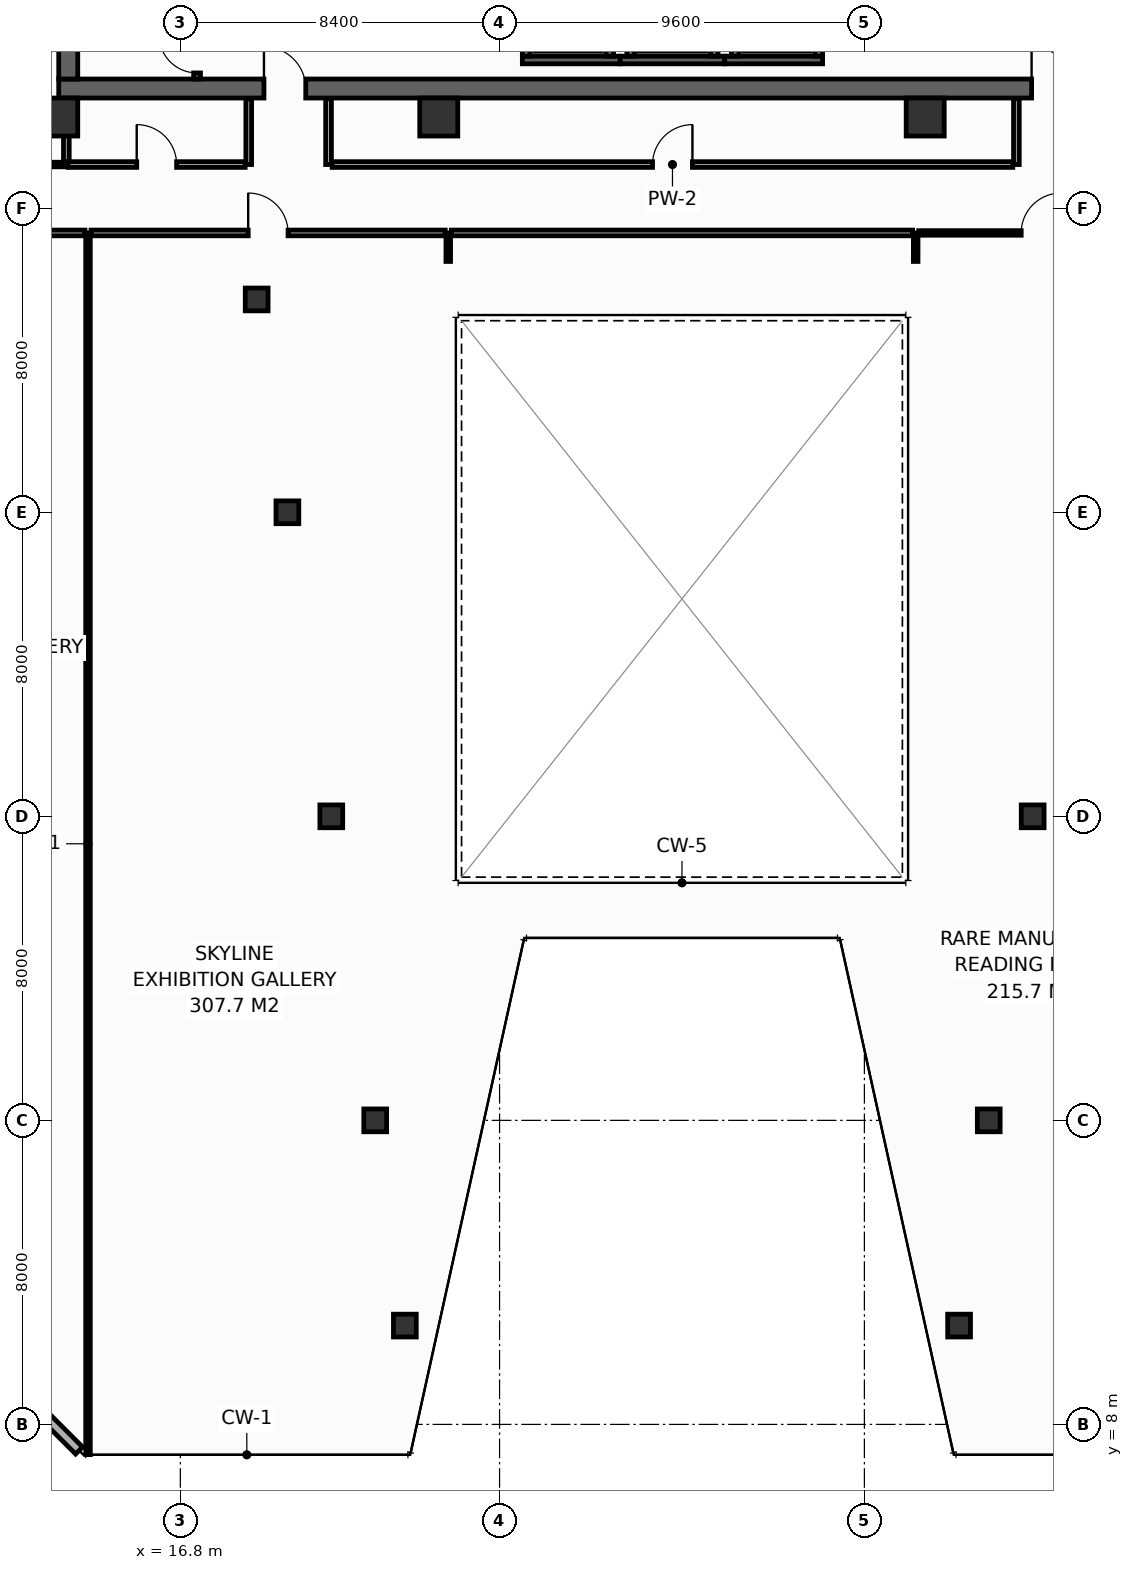
"""IFC4 building model, lengths in metres.
Left out: names, types, materials, properties, quantities, classifications, styles, units other than length and angle.
Written with IfcOpenShell. Run it as: python <this file> out.ifc"""

import sys

from ifc_helpers import new_model, si_unit, direction, frame, frame_2d, origin, origin_2d, place, context, subcontext, project, spatial, rectangle, hollow_rectangle, extrude, element, fill, save


model = new_model("IFC4")
c1 = context("Model", 3, precision=1e-05, world=origin(), true_north=direction((0.0, 1.0)))
c2 = subcontext(c1, "Body", "Model", "MODEL_VIEW")
j1 = project(units=[si_unit("LENGTHUNIT", "METRE"), si_unit("PLANEANGLEUNIT", "RADIAN")], contexts=[c1])
p1 = place(None, origin())
s1 = spatial("IfcSite", under=j1, at=p1, CompositionType="ELEMENT")
p2 = place(p1, origin())
s2 = spatial("IfcBuilding", under=s1, at=p2, CompositionType="ELEMENT")
p3 = place(p2, frame((0.0, 0.0, 156.2)))
s3 = spatial("IfcBuildingStorey", under=s2, at=p3, CompositionType="ELEMENT", Elevation=156.2)
p4 = place(p3, frame((13.6, 43.15, 0.0), z_axis=(0.0, 0.0, 1.0), x_axis=(1.0, 0.0, 0.0)))
e1 = element("IfcWall", 1, at=p4, inside=s3, PredefinedType="SHEAR", context=c2, shape_type="SweptSolid", body=[
    extrude(rectangle(XDim=32.7, YDim=0.5, at=frame_2d((16.35, 0.0))), origin(), (0.0, 0.0, 1.0), 3.55),
])
p5 = place(p4, frame((5.4, 0.0, 0.0)))
e2 = element("IfcOpeningElement", 2, at=p5, cuts=e1, PredefinedType="OPENING", context=c2, shape_type="SweptSolid", body=[
    extrude(rectangle(XDim=1.1, YDim=2.15, at=frame_2d((0.55, 1.075))), frame((0.0, 0.26, 0.0), z_axis=(0.0, -1.0, 0.0), x_axis=(1.0, 0.0, 0.0)), (0.0, 0.0, 1.0), 0.52),
])
p6 = place(p4, frame((25.6, 0.0, 0.0)))
e3 = element("IfcOpeningElement", 3, at=p6, cuts=e1, PredefinedType="OPENING", context=c2, shape_type="SweptSolid", body=[
    extrude(rectangle(XDim=1.1, YDim=2.15, at=frame_2d((0.55, 1.075))), frame((0.0, 0.26, 0.0), z_axis=(0.0, -1.0, 0.0), x_axis=(1.0, 0.0, 0.0)), (0.0, 0.0, 1.0), 0.52),
])
p7 = place(p3, frame((13.85, 43.4, 0.0), z_axis=(0.0, 0.0, 1.0), x_axis=(0.0, 1.0, 0.0)))
e4 = element("IfcWall", 4, at=p7, inside=s3, PredefinedType="SHEAR", context=c2, shape_type="SweptSolid", body=[
    extrude(rectangle(XDim=10.4, YDim=0.5, at=frame_2d((5.2, 0.0))), origin(), (0.0, 0.0, 1.0), 3.55),
])
for number, where, z_axis, x_axis in (
    (5, (13.6, 42.4, 0.0), (0.0, 0.0, 1.0), (1.0, 0.0, 0.0)),
    (6, (23.6, 42.4, 0.0), (0.0, 0.0, 1.0), (1.0, 0.0, 0.0)),
    (7, (36.4, 42.4, 0.0), (0.0, 0.0, 1.0), (1.0, 0.0, 0.0)),
):
    element("IfcColumn", number, at=place(p3, frame(where, z_axis=z_axis, x_axis=x_axis)), inside=s3, PredefinedType="COLUMN", context=c2, shape_type="SweptSolid", body=[
        extrude(hollow_rectangle(XDim=1.0, YDim=1.0, WallThickness=0.045, at=origin_2d()), origin(), (0.0, 0.0, 1.0), 3.8),
    ])
for number, where, z_axis, x_axis in (
    (8, (22.708, 10.6, 0.0), (0.0, 0.0, 1.0), (1.0, 0.0, 0.0)),
    (9, (37.292, 10.6, 0.0), (0.0, 0.0, 1.0), (1.0, 0.0, 0.0)),
    (10, (21.928, 16.0, 0.0), (0.0, 0.0, 1.0), (1.0, 0.0, 0.0)),
    (11, (38.072, 16.0, 0.0), (0.0, 0.0, 1.0), (1.0, 0.0, 0.0)),
    (12, (20.772, 24.0, 0.0), (0.0, 0.0, 1.0), (1.0, 0.0, 0.0)),
    (13, (39.228, 24.0, 0.0), (0.0, 0.0, 1.0), (1.0, 0.0, 0.0)),
    (14, (19.617, 32.0, 0.0), (0.0, 0.0, 1.0), (1.0, 0.0, 0.0)),
    (15, (18.808, 37.6, 0.0), (0.0, 0.0, 1.0), (1.0, 0.0, 0.0)),
):
    element("IfcColumn", number, at=place(p3, frame(where, z_axis=z_axis, x_axis=x_axis)), inside=s3, PredefinedType="COLUMN", context=c2, shape_type="SweptSolid", body=[
        extrude(hollow_rectangle(XDim=0.6, YDim=0.6, WallThickness=0.028, at=origin_2d()), origin(), (0.0, 0.0, 1.0), 3.8),
    ])
p8 = place(p3, frame((25.8, 43.9, 0.0), z_axis=(0.0, 0.0, 1.0), x_axis=(1.0, 0.0, 0.0)))
e16 = element("IfcWall", 16, at=p8, inside=s3, PredefinedType="SHEAR", context=c2, shape_type="SweptSolid", body=[
    extrude(rectangle(XDim=2.575, YDim=0.2, at=frame_2d((1.288, 0.0))), origin(), (0.0, 0.0, 1.0), 3.55),
])
for number, where, z_axis, x_axis in (
    (17, (25.9, 44.0, 0.0), (0.0, 0.0, 1.0), (0.0, 1.0, 0.0)),
    (18, (28.1, 44.0, 0.0), (0.0, 0.0, 1.0), (0.0, 1.0, 0.0)),
):
    element("IfcWall", number, at=place(p3, frame(where, z_axis=z_axis, x_axis=x_axis)), inside=s3, PredefinedType="SHEAR", context=c2, shape_type="SweptSolid", body=[
        extrude(rectangle(XDim=2.3, YDim=0.2, at=frame_2d((1.15, 0.0))), origin(), (0.0, 0.0, 1.0), 3.55),
    ])
p9 = place(p3, frame((28.375, 43.9, 0.0), z_axis=(0.0, 0.0, 1.0), x_axis=(1.0, 0.0, 0.0)))
e19 = element("IfcWall", 19, at=p9, inside=s3, PredefinedType="SHEAR", context=c2, shape_type="SweptSolid", body=[
    extrude(rectangle(XDim=2.75, YDim=0.2, at=frame_2d((1.375, 0.0))), origin(), (0.0, 0.0, 1.0), 3.55),
])
for number, where, z_axis, x_axis in (
    (20, (28.65, 44.0, 0.0), (0.0, 0.0, 1.0), (0.0, 1.0, 0.0)),
    (21, (30.85, 44.0, 0.0), (0.0, 0.0, 1.0), (0.0, 1.0, 0.0)),
):
    element("IfcWall", number, at=place(p3, frame(where, z_axis=z_axis, x_axis=x_axis)), inside=s3, PredefinedType="SHEAR", context=c2, shape_type="SweptSolid", body=[
        extrude(rectangle(XDim=2.3, YDim=0.2, at=frame_2d((1.15, 0.0))), origin(), (0.0, 0.0, 1.0), 3.55),
    ])
p10 = place(p3, frame((31.125, 43.9, 0.0), z_axis=(0.0, 0.0, 1.0), x_axis=(1.0, 0.0, 0.0)))
e22 = element("IfcWall", 22, at=p10, inside=s3, PredefinedType="SHEAR", context=c2, shape_type="SweptSolid", body=[
    extrude(rectangle(XDim=2.575, YDim=0.2, at=frame_2d((1.288, 0.0))), origin(), (0.0, 0.0, 1.0), 3.55),
])
for number, where, z_axis, x_axis in (
    (23, (31.4, 44.0, 0.0), (0.0, 0.0, 1.0), (0.0, 1.0, 0.0)),
    (24, (33.6, 44.0, 0.0), (0.0, 0.0, 1.0), (0.0, 1.0, 0.0)),
):
    element("IfcWall", number, at=place(p3, frame(where, z_axis=z_axis, x_axis=x_axis)), inside=s3, PredefinedType="SHEAR", context=c2, shape_type="SweptSolid", body=[
        extrude(rectangle(XDim=2.3, YDim=0.2, at=frame_2d((1.15, 0.0))), origin(), (0.0, 0.0, 1.0), 3.55),
    ])
p11 = place(p3, frame((17.24, 43.4, 0.0), z_axis=(0.0, 0.0, 1.0), x_axis=(0.0, 1.0, 0.0)))
e25 = element("IfcWall", 25, at=p11, inside=s3, PredefinedType="SHEAR", context=c2, shape_type="SweptSolid", body=[
    extrude(rectangle(XDim=10.4, YDim=0.18, at=frame_2d((5.2, 0.0))), origin(), (0.0, 0.0, 1.0), 3.55),
])
p12 = place(p11, frame((0.16, 0.0, 0.0)))
e26 = element("IfcOpeningElement", 26, at=p12, cuts=e25, PredefinedType="OPENING", context=c2, shape_type="SweptSolid", body=[
    extrude(rectangle(XDim=1.0, YDim=2.15, at=frame_2d((0.5, 1.075))), frame((0.0, 0.1, 0.0), z_axis=(0.0, -1.0, 0.0), x_axis=(1.0, 0.0, 0.0)), (0.0, 0.0, 1.0), 0.2),
])
p13 = place(p3, frame((11.162, 10.287, 0.0), z_axis=(0.0, 0.0, 1.0), x_axis=(0.70707775441, -0.707135806771, 0.0)))
e27 = element("IfcWall", 27, at=p13, inside=s3, PredefinedType="STANDARD", context=c2, shape_type="SweptSolid", body=[
    extrude(rectangle(XDim=4.206, YDim=0.26, at=frame_2d((2.103, 0.0))), origin(), (0.0, 0.0, 1.0), 3.55),
])
p14 = place(p3, frame((11.5, 41.15, 0.0), z_axis=(0.0, 0.0, 1.0), x_axis=(1.0, 0.0, 0.0)))
e28 = element("IfcWall", 28, at=p14, inside=s3, PredefinedType="PARTITIONING", context=c2, shape_type="SweptSolid", body=[
    extrude(rectangle(XDim=2.35, YDim=0.12, at=frame_2d((1.175, 0.0))), origin(), (0.0, 0.0, 1.0), 3.55),
])
p15 = place(p3, frame((13.8, 41.23, 0.0), z_axis=(0.0, 0.0, 1.0), x_axis=(0.0, 1.0, 0.0)))
e29 = element("IfcWall", 29, at=p15, inside=s3, PredefinedType="PARTITIONING", context=c2, shape_type="SweptSolid", body=[
    extrude(rectangle(XDim=1.65, YDim=0.15, at=frame_2d((0.825, 0.0))), origin(), (0.0, 0.0, 1.0), 3.55),
])
for number, where, z_axis, x_axis in (
    (30, (18.6, 41.15, 0.0), (0.0, 0.0, 1.0), (0.0, 1.0, 0.0)),
    (31, (20.7, 41.15, 0.0), (0.0, 0.0, 1.0), (0.0, 1.0, 0.0)),
    (32, (38.8, 41.15, 0.0), (0.0, 0.0, 1.0), (0.0, 1.0, 0.0)),
):
    element("IfcWall", number, at=place(p3, frame(where, z_axis=z_axis, x_axis=x_axis)), inside=s3, PredefinedType="PARTITIONING", context=c2, shape_type="SweptSolid", body=[
        extrude(rectangle(XDim=1.73, YDim=0.15, at=frame_2d((0.865, 0.0))), origin(), (0.0, 0.0, 1.0), 3.55),
    ])
p16 = place(p3, frame((13.85, 41.15, 0.0), z_axis=(0.0, 0.0, 1.0), x_axis=(1.0, 0.0, 0.0)))
e33 = element("IfcWall", 33, at=p16, inside=s3, PredefinedType="PARTITIONING", context=c2, shape_type="SweptSolid", body=[
    extrude(rectangle(XDim=4.655, YDim=0.15, at=frame_2d((2.327, 0.0))), origin(), (0.0, 0.0, 1.0), 3.55),
])
p17 = place(p16, frame((1.802, 0.0, 0.0)))
e34 = element("IfcOpeningElement", 34, at=p17, cuts=e33, PredefinedType="OPENING", context=c2, shape_type="SweptSolid", body=[
    extrude(rectangle(XDim=1.05, YDim=2.15, at=frame_2d((0.525, 1.075))), frame((0.0, 0.085, 0.0), z_axis=(0.0, -1.0, 0.0), x_axis=(1.0, 0.0, 0.0)), (0.0, 0.0, 1.0), 0.17),
])
p18 = place(p3, frame((20.795, 41.15, 0.0), z_axis=(0.0, 0.0, 1.0), x_axis=(1.0, 0.0, 0.0)))
e35 = element("IfcWall", 35, at=p18, inside=s3, PredefinedType="PARTITIONING", context=c2, shape_type="SweptSolid", body=[
    extrude(rectangle(XDim=17.91, YDim=0.15, at=frame_2d((8.955, 0.0))), origin(), (0.0, 0.0, 1.0), 2.835),
])
p19 = place(p18, frame((8.43, 0.0, 0.0)))
e36 = element("IfcOpeningElement", 36, at=p19, cuts=e35, PredefinedType="OPENING", context=c2, shape_type="SweptSolid", body=[
    extrude(rectangle(XDim=1.05, YDim=2.15, at=frame_2d((0.525, 1.075))), frame((0.0, 0.085, 0.0), z_axis=(0.0, -1.0, 0.0), x_axis=(1.0, 0.0, 0.0)), (0.0, 0.0, 1.0), 0.17),
])
p20 = place(p3, frame((14.37, 7.205, 0.0), z_axis=(0.0, 0.0, 1.0), x_axis=(0.0, 1.0, 0.0)))
e37 = element("IfcWall", 37, at=p20, inside=s3, PredefinedType="PARTITIONING", context=c2, shape_type="SweptSolid", body=[
    extrude(rectangle(XDim=32.145, YDim=0.12, at=frame_2d((16.073, 0.0))), origin(), (0.0, 0.0, 1.0), 2.835),
])
for number, where, z_axis, x_axis in (
    (38, (23.85, 38.6, 0.0), (0.0, 0.0, 1.0), (0.0, 1.0, 0.0)),
    (39, (36.15, 38.6, 0.0), (0.0, 0.0, 1.0), (0.0, 1.0, 0.0)),
):
    element("IfcWall", number, at=place(p3, frame(where, z_axis=z_axis, x_axis=x_axis)), inside=s3, PredefinedType="PARTITIONING", context=c2, shape_type="SweptSolid", body=[
        extrude(rectangle(XDim=0.75, YDim=0.12, at=frame_2d((0.375, 0.0))), origin(), (0.0, 0.0, 1.0), 3.55),
    ])
p21 = place(p3, frame((6.305, 39.35, 0.0), z_axis=(0.0, 0.0, 1.0), x_axis=(1.0, 0.0, 0.0)))
e40 = element("IfcWall", 40, at=p21, inside=s3, PredefinedType="PARTITIONING", context=c2, shape_type="SweptSolid", body=[
    extrude(rectangle(XDim=7.985, YDim=0.15, at=frame_2d((3.993, 0.0))), origin(), (0.0, 0.0, 1.0), 3.035),
])
p22 = place(p21, frame((3.467, 0.0, 0.0)))
e41 = element("IfcOpeningElement", 41, at=p22, cuts=e40, PredefinedType="OPENING", context=c2, shape_type="SweptSolid", body=[
    extrude(rectangle(XDim=1.05, YDim=2.15, at=frame_2d((0.525, 1.075))), frame((0.0, 0.085, 0.0), z_axis=(0.0, -1.0, 0.0), x_axis=(1.0, 0.0, 0.0)), (0.0, 0.0, 1.0), 0.17),
])
p23 = place(p3, frame((14.45, 39.35, 0.0), z_axis=(0.0, 0.0, 1.0), x_axis=(1.0, 0.0, 0.0)))
e42 = element("IfcWall", 42, at=p23, inside=s3, PredefinedType="PARTITIONING", context=c2, shape_type="SweptSolid", body=[
    extrude(rectangle(XDim=9.32, YDim=0.15, at=frame_2d((4.66, 0.0))), origin(), (0.0, 0.0, 1.0), 2.835),
])
p24 = place(p23, frame((4.135, 0.0, 0.0)))
e43 = element("IfcOpeningElement", 43, at=p24, cuts=e42, PredefinedType="OPENING", context=c2, shape_type="SweptSolid", body=[
    extrude(rectangle(XDim=1.05, YDim=2.15, at=frame_2d((0.525, 1.075))), frame((0.0, 0.085, 0.0), z_axis=(0.0, -1.0, 0.0), x_axis=(1.0, 0.0, 0.0)), (0.0, 0.0, 1.0), 0.17),
])
p25 = place(p3, frame((23.93, 39.35, 0.0), z_axis=(0.0, 0.0, 1.0), x_axis=(1.0, 0.0, 0.0)))
e44 = element("IfcWall", 44, at=p25, inside=s3, PredefinedType="PARTITIONING", context=c2, shape_type="SweptSolid", body=[
    extrude(rectangle(XDim=12.14, YDim=0.15, at=frame_2d((6.07, 0.0))), origin(), (0.0, 0.0, 1.0), 3.55),
])
p26 = place(p3, frame((36.23, 39.35, 0.0), z_axis=(0.0, 0.0, 1.0), x_axis=(1.0, 0.0, 0.0)))
e45 = element("IfcWall", 45, at=p26, inside=s3, PredefinedType="PARTITIONING", context=c2, shape_type="SweptSolid", body=[
    extrude(rectangle(XDim=6.443, YDim=0.12, at=frame_2d((3.221, 0.0))), origin(), (0.0, 0.0, 1.0), 2.835),
])
p27 = place(p26, frame((2.696, 0.0, 0.0)))
e46 = element("IfcOpeningElement", 46, at=p27, cuts=e45, PredefinedType="OPENING", context=c2, shape_type="SweptSolid", body=[
    extrude(rectangle(XDim=1.05, YDim=2.15, at=frame_2d((0.525, 1.075))), frame((0.0, 0.07, 0.0), z_axis=(0.0, -1.0, 0.0), x_axis=(1.0, 0.0, 0.0)), (0.0, 0.0, 1.0), 0.14),
])
p28 = place(p12, origin())
e47 = element("IfcDoor", 47, at=p28, inside=s3, OperationType="SINGLE_SWING_RIGHT", PredefinedType="DOOR", context=c2, shape_type="SweptSolid", body=[
    extrude(rectangle(XDim=1.0, YDim=2.15, at=frame_2d((0.5, 1.075))), frame((0.0, 0.025, 0.0), z_axis=(0.0, -1.0, 0.0), x_axis=(1.0, 0.0, 0.0)), (0.0, 0.0, 1.0), 0.05),
])
fill(e26, e47)
p29 = place(p5, origin())
e48 = element("IfcDoor", 48, at=p29, inside=s3, OperationType="SINGLE_SWING_LEFT", PredefinedType="DOOR", context=c2, shape_type="SweptSolid", body=[
    extrude(rectangle(XDim=1.1, YDim=2.15, at=frame_2d((0.55, 1.075))), frame((0.0, 0.025, 0.0), z_axis=(0.0, -1.0, 0.0), x_axis=(1.0, 0.0, 0.0)), (0.0, 0.0, 1.0), 0.05),
])
fill(e2, e48)
p30 = place(p6, origin())
e49 = element("IfcDoor", 49, at=p30, inside=s3, OperationType="SINGLE_SWING_LEFT", PredefinedType="DOOR", context=c2, shape_type="SweptSolid", body=[
    extrude(rectangle(XDim=1.1, YDim=2.15, at=frame_2d((0.55, 1.075))), frame((0.0, 0.025, 0.0), z_axis=(0.0, -1.0, 0.0), x_axis=(1.0, 0.0, 0.0)), (0.0, 0.0, 1.0), 0.05),
])
fill(e3, e49)
p31 = place(p17, origin())
e50 = element("IfcDoor", 50, at=p31, inside=s3, OperationType="SINGLE_SWING_LEFT", PredefinedType="DOOR", context=c2, shape_type="SweptSolid", body=[
    extrude(rectangle(XDim=1.05, YDim=2.15, at=frame_2d((0.525, 1.075))), frame((0.0, 0.025, 0.0), z_axis=(0.0, -1.0, 0.0), x_axis=(1.0, 0.0, 0.0)), (0.0, 0.0, 1.0), 0.05),
])
fill(e34, e50)
p32 = place(p19, origin())
e51 = element("IfcDoor", 51, at=p32, inside=s3, OperationType="SINGLE_SWING_RIGHT", PredefinedType="DOOR", context=c2, shape_type="SweptSolid", body=[
    extrude(rectangle(XDim=1.05, YDim=2.15, at=frame_2d((0.525, 1.075))), frame((0.0, 0.025, 0.0), z_axis=(0.0, -1.0, 0.0), x_axis=(1.0, 0.0, 0.0)), (0.0, 0.0, 1.0), 0.05),
])
fill(e36, e51)
p33 = place(p24, origin())
e52 = element("IfcDoor", 52, at=p33, inside=s3, OperationType="SINGLE_SWING_LEFT", PredefinedType="DOOR", context=c2, shape_type="SweptSolid", body=[
    extrude(rectangle(XDim=1.05, YDim=2.15, at=frame_2d((0.525, 1.075))), frame((0.0, 0.025, 0.0), z_axis=(0.0, -1.0, 0.0), x_axis=(1.0, 0.0, 0.0)), (0.0, 0.0, 1.0), 0.05),
])
fill(e43, e52)
p34 = place(p27, origin())
e53 = element("IfcDoor", 53, at=p34, inside=s3, OperationType="SINGLE_SWING_RIGHT", PredefinedType="DOOR", context=c2, shape_type="SweptSolid", body=[
    extrude(rectangle(XDim=1.05, YDim=2.15, at=frame_2d((0.525, 1.075))), frame((0.0, 0.025, 0.0), z_axis=(0.0, -1.0, 0.0), x_axis=(1.0, 0.0, 0.0)), (0.0, 0.0, 1.0), 0.05),
])
fill(e46, e53)
save(model, sys.argv[1])
